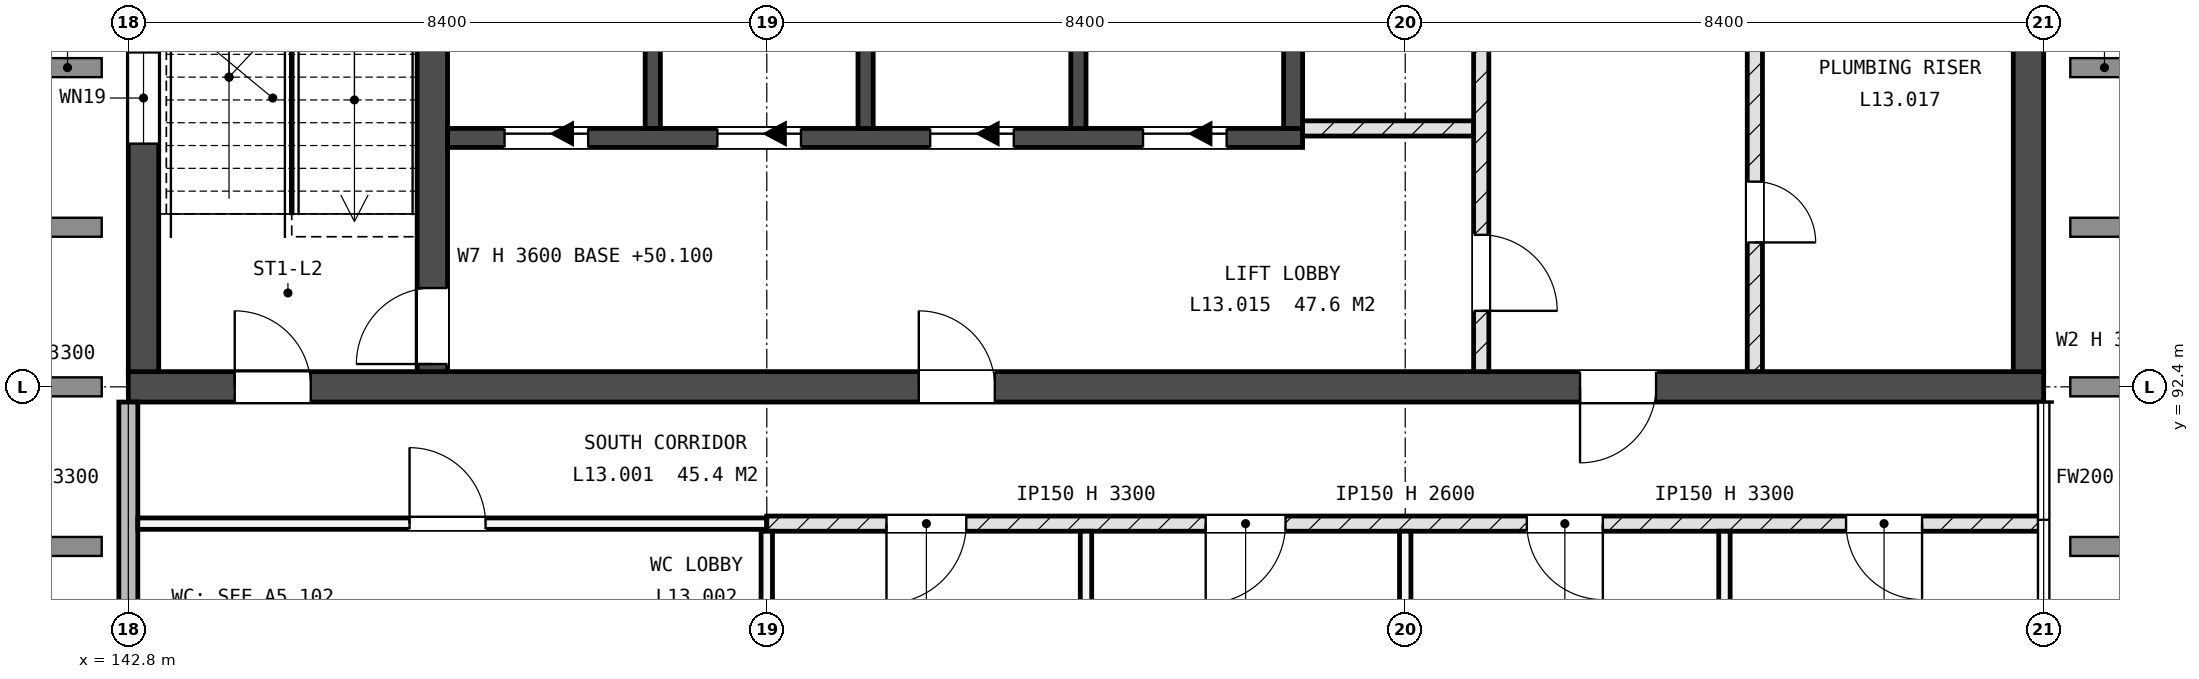
"""IFC4 building model, lengths in metres.
Left out: names, types, materials, properties, quantities, classifications, styles, units other than length and angle.
Written with IfcOpenShell. Run it as: python <this file> out.ifc"""

import sys

from ifc_helpers import new_model, si_unit, direction, frame, frame_2d, origin, place, context, subcontext, project, spatial, rectangle, extrude, element, fill, save


model = new_model("IFC4")
c1 = context("Model", 3, precision=1e-05, world=origin(), true_north=direction((0.0, 1.0)))
c2 = subcontext(c1, "Body", "Model", "MODEL_VIEW")
j1 = project(units=[si_unit("LENGTHUNIT", "METRE"), si_unit("PLANEANGLEUNIT", "RADIAN")], contexts=[c1])
p1 = place(None, origin())
s1 = spatial("IfcSite", under=j1, at=p1, CompositionType="ELEMENT")
p2 = place(p1, origin())
s2 = spatial("IfcBuilding", under=s1, at=p2, CompositionType="ELEMENT")
p3 = place(p2, frame((0.0, 0.0, 50.4)))
s3 = spatial("IfcBuildingStorey", under=s2, at=p3, CompositionType="ELEMENT", Elevation=50.4)
p4 = place(p3, frame((142.8, 92.4, -0.3), z_axis=(0.0, 0.0, 1.0), x_axis=(1.0, 0.0, 0.0)))
e1 = element("IfcWall", 1, at=p4, inside=s3, PredefinedType="SHEAR", context=c2, shape_type="SweptSolid", body=[
    extrude(rectangle(XDim=25.2, YDim=0.4, at=frame_2d((12.6, 0.0))), origin(), (0.0, 0.0, 1.0), 3.6),
])
p5 = place(p4, frame((1.4, 0.0, 0.3)))
e2 = element("IfcOpeningElement", 2, at=p5, cuts=e1, PredefinedType="OPENING", context=c2, shape_type="SweptSolid", body=[
    extrude(rectangle(XDim=1.0, YDim=2.1, at=frame_2d((0.5, 1.05))), frame((0.0, 0.21, 0.0), z_axis=(0.0, -1.0, 0.0), x_axis=(1.0, 0.0, 0.0)), (0.0, 0.0, 1.0), 0.42),
])
p6 = place(p4, frame((19.1, 0.0, 0.3)))
e3 = element("IfcOpeningElement", 3, at=p6, cuts=e1, PredefinedType="OPENING", context=c2, shape_type="SweptSolid", body=[
    extrude(rectangle(XDim=1.0, YDim=2.1, at=frame_2d((0.5, 1.05))), frame((0.0, 0.21, 0.0), z_axis=(0.0, -1.0, 0.0), x_axis=(1.0, 0.0, 0.0)), (0.0, 0.0, 1.0), 0.42),
])
p7 = place(p4, frame((10.4, 0.0, 0.3)))
e4 = element("IfcOpeningElement", 4, at=p7, cuts=e1, PredefinedType="OPENING", context=c2, shape_type="SweptSolid", body=[
    extrude(rectangle(XDim=1.0, YDim=2.1, at=frame_2d((0.5, 1.05))), frame((0.0, 0.21, 0.0), z_axis=(0.0, -1.0, 0.0), x_axis=(1.0, 0.0, 0.0)), (0.0, 0.0, 1.0), 0.42),
])
p8 = place(p3, frame((143.0, 92.6, -0.3), z_axis=(0.0, 0.0, 1.0), x_axis=(0.0, 1.0, 0.0)))
e5 = element("IfcWall", 5, at=p8, inside=s3, PredefinedType="SHEAR", context=c2, shape_type="SweptSolid", body=[
    extrude(rectangle(XDim=16.4, YDim=0.4, at=frame_2d((8.2, 0.0))), origin(), (0.0, 0.0, 1.0), 3.6),
])
p9 = place(p8, frame((3.0, 0.0, 1.9)))
e6 = element("IfcOpeningElement", 6, at=p9, cuts=e5, PredefinedType="OPENING", context=c2, shape_type="SweptSolid", body=[
    extrude(rectangle(XDim=1.2, YDim=0.9, at=frame_2d((0.6, 0.45))), frame((0.0, 0.21, 0.0), z_axis=(0.0, -1.0, 0.0), x_axis=(1.0, 0.0, 0.0)), (0.0, 0.0, 1.0), 0.42),
])
p10 = place(p3, frame((167.8, 92.6, -0.3), z_axis=(0.0, 0.0, 1.0), x_axis=(0.0, 1.0, 0.0)))
e7 = element("IfcWall", 7, at=p10, inside=s3, PredefinedType="SHEAR", context=c2, shape_type="SweptSolid", body=[
    extrude(rectangle(XDim=16.4, YDim=0.4, at=frame_2d((8.2, 0.0))), origin(), (0.0, 0.0, 1.0), 3.6),
])
p11 = place(p10, frame((12.2, 0.0, 1.9)))
e8 = element("IfcOpeningElement", 8, at=p11, cuts=e7, PredefinedType="OPENING", context=c2, shape_type="SweptSolid", body=[
    extrude(rectangle(XDim=1.2, YDim=0.9, at=frame_2d((0.6, 0.45))), frame((0.0, 0.21, 0.0), z_axis=(0.0, -1.0, 0.0), x_axis=(1.0, 0.0, 0.0)), (0.0, 0.0, 1.0), 0.42),
])
p12 = place(p3, frame((146.8, 92.6, -0.3), z_axis=(0.0, 0.0, 1.0), x_axis=(0.0, 1.0, 0.0)))
e9 = element("IfcWall", 9, at=p12, inside=s3, PredefinedType="SHEAR", context=c2, shape_type="SweptSolid", body=[
    extrude(rectangle(XDim=7.525, YDim=0.4, at=frame_2d((3.762, 0.0))), origin(), (0.0, 0.0, 1.0), 3.6),
])
p13 = place(p12, frame((0.1, 0.0, 0.3)))
e10 = element("IfcOpeningElement", 10, at=p13, cuts=e9, PredefinedType="OPENING", context=c2, shape_type="SweptSolid", body=[
    extrude(rectangle(XDim=1.0, YDim=2.1, at=frame_2d((0.5, 1.05))), frame((0.0, 0.21, 0.0), z_axis=(0.0, -1.0, 0.0), x_axis=(1.0, 0.0, 0.0)), (0.0, 0.0, 1.0), 0.42),
])
p14 = place(p3, frame((147.0, 95.675, -0.3), z_axis=(0.0, 0.0, 1.0), x_axis=(1.0, 0.0, 0.0)))
e11 = element("IfcWall", 11, at=p14, inside=s3, PredefinedType="SHEAR", context=c2, shape_type="SweptSolid", body=[
    extrude(rectangle(XDim=11.25, YDim=0.25, at=frame_2d((5.625, 0.0))), origin(), (0.0, 0.0, 1.0), 3.6),
])
p15 = place(p14, frame((0.75, 0.0, 0.3)))
e12 = element("IfcOpeningElement", 12, at=p15, cuts=e11, PredefinedType="OPENING", context=c2, shape_type="SweptSolid", body=[
    extrude(rectangle(XDim=1.1, YDim=2.1, at=frame_2d((0.55, 1.05))), frame((0.0, 0.135, 0.0), z_axis=(0.0, -1.0, 0.0), x_axis=(1.0, 0.0, 0.0)), (0.0, 0.0, 1.0), 0.27),
])
p16 = place(p14, frame((3.55, 0.0, 0.3)))
e13 = element("IfcOpeningElement", 13, at=p16, cuts=e11, PredefinedType="OPENING", context=c2, shape_type="SweptSolid", body=[
    extrude(rectangle(XDim=1.1, YDim=2.1, at=frame_2d((0.55, 1.05))), frame((0.0, 0.135, 0.0), z_axis=(0.0, -1.0, 0.0), x_axis=(1.0, 0.0, 0.0)), (0.0, 0.0, 1.0), 0.27),
])
p17 = place(p14, frame((6.35, 0.0, 0.3)))
e14 = element("IfcOpeningElement", 14, at=p17, cuts=e11, PredefinedType="OPENING", context=c2, shape_type="SweptSolid", body=[
    extrude(rectangle(XDim=1.1, YDim=2.1, at=frame_2d((0.55, 1.05))), frame((0.0, 0.135, 0.0), z_axis=(0.0, -1.0, 0.0), x_axis=(1.0, 0.0, 0.0)), (0.0, 0.0, 1.0), 0.27),
])
p18 = place(p14, frame((9.15, 0.0, 0.3)))
e15 = element("IfcOpeningElement", 15, at=p18, cuts=e11, PredefinedType="OPENING", context=c2, shape_type="SweptSolid", body=[
    extrude(rectangle(XDim=1.1, YDim=2.1, at=frame_2d((0.55, 1.05))), frame((0.0, 0.135, 0.0), z_axis=(0.0, -1.0, 0.0), x_axis=(1.0, 0.0, 0.0)), (0.0, 0.0, 1.0), 0.27),
])
p19 = place(p3, frame((158.125, 95.8, -0.3), z_axis=(0.0, 0.0, 1.0), x_axis=(0.0, 1.0, 0.0)))
e16 = element("IfcWall", 16, at=p19, inside=s3, PredefinedType="SHEAR", context=c2, shape_type="SweptSolid", body=[
    extrude(rectangle(XDim=2.9, YDim=0.25, at=frame_2d((1.45, 0.0))), origin(), (0.0, 0.0, 1.0), 3.6),
])
for number, where, z_axis, x_axis in (
    (17, (149.7, 95.8, -0.3), (0.0, 0.0, 1.0), (0.0, 1.0, 0.0)),
    (18, (152.5, 95.8, -0.3), (0.0, 0.0, 1.0), (0.0, 1.0, 0.0)),
    (19, (155.3, 95.8, -0.3), (0.0, 0.0, 1.0), (0.0, 1.0, 0.0)),
):
    element("IfcWall", number, at=place(p3, frame(where, z_axis=z_axis, x_axis=x_axis)), inside=s3, PredefinedType="SHEAR", context=c2, shape_type="SweptSolid", body=[
        extrude(rectangle(XDim=2.9, YDim=0.2, at=frame_2d((1.45, 0.0))), origin(), (0.0, 0.0, 1.0), 3.6),
    ])
p20 = place(p3, frame((142.8, 84.35, 0.0), z_axis=(0.0, 0.0, 1.0), x_axis=(0.0, 1.0, 0.0)))
e20 = element("IfcWall", 20, at=p20, inside=s3, PredefinedType="STANDARD", context=c2, shape_type="SweptSolid", body=[
    extrude(rectangle(XDim=7.85, YDim=0.25, at=frame_2d((3.925, 0.0))), origin(), (0.0, 0.0, 1.0), 3.3),
])
p21 = place(p20, frame((2.35, 0.0, 2.1)))
e21 = element("IfcOpeningElement", 21, at=p21, cuts=e20, PredefinedType="OPENING", context=c2, shape_type="SweptSolid", body=[
    extrude(rectangle(XDim=0.9, YDim=0.6, at=frame_2d((0.45, 0.3))), frame((0.0, 0.135, 0.0), z_axis=(0.0, -1.0, 0.0), x_axis=(1.0, 0.0, 0.0)), (0.0, 0.0, 1.0), 0.27),
])
p22 = place(p3, frame((142.925, 90.6, 0.0), z_axis=(0.0, 0.0, 1.0), x_axis=(1.0, 0.0, 0.0)))
e22 = element("IfcWall", 22, at=p22, inside=s3, PredefinedType="PARTITIONING", context=c2, shape_type="SweptSolid", body=[
    extrude(rectangle(XDim=8.275, YDim=0.15, at=frame_2d((4.137, 0.0))), origin(), (0.0, 0.0, 1.0), 3.3),
])
p23 = place(p22, frame((3.575, 0.0, 0.0)))
e23 = element("IfcOpeningElement", 23, at=p23, cuts=e22, PredefinedType="OPENING", context=c2, shape_type="SweptSolid", body=[
    extrude(rectangle(XDim=1.0, YDim=2.1, at=frame_2d((0.5, 1.05))), frame((0.0, 0.085, 0.0), z_axis=(0.0, -1.0, 0.0), x_axis=(1.0, 0.0, 0.0)), (0.0, 0.0, 1.0), 0.17),
])
p24 = place(p3, frame((151.2, 90.6, 0.0), z_axis=(0.0, 0.0, 1.0), x_axis=(1.0, 0.0, 0.0)))
e24 = element("IfcWall", 24, at=p24, inside=s3, PredefinedType="SOLIDWALL", context=c2, shape_type="SweptSolid", body=[
    extrude(rectangle(XDim=16.8, YDim=0.2, at=frame_2d((8.4, 0.0))), origin(), (0.0, 0.0, 1.0), 3.3),
])
p25 = place(p24, frame((1.575, 0.0, 0.0)))
e25 = element("IfcOpeningElement", 25, at=p25, cuts=e24, PredefinedType="OPENING", context=c2, shape_type="SweptSolid", body=[
    extrude(rectangle(XDim=1.05, YDim=2.1, at=frame_2d((0.525, 1.05))), frame((0.0, 0.11, 0.0), z_axis=(0.0, -1.0, 0.0), x_axis=(1.0, 0.0, 0.0)), (0.0, 0.0, 1.0), 0.22),
])
p26 = place(p24, frame((5.775, 0.0, 0.0)))
e26 = element("IfcOpeningElement", 26, at=p26, cuts=e24, PredefinedType="OPENING", context=c2, shape_type="SweptSolid", body=[
    extrude(rectangle(XDim=1.05, YDim=2.1, at=frame_2d((0.525, 1.05))), frame((0.0, 0.11, 0.0), z_axis=(0.0, -1.0, 0.0), x_axis=(1.0, 0.0, 0.0)), (0.0, 0.0, 1.0), 0.22),
])
p27 = place(p24, frame((10.0, 0.0, 0.0)))
e27 = element("IfcOpeningElement", 27, at=p27, cuts=e24, PredefinedType="OPENING", context=c2, shape_type="SweptSolid", body=[
    extrude(rectangle(XDim=1.0, YDim=2.1, at=frame_2d((0.5, 1.05))), frame((0.0, 0.11, 0.0), z_axis=(0.0, -1.0, 0.0), x_axis=(1.0, 0.0, 0.0)), (0.0, 0.0, 1.0), 0.22),
])
p28 = place(p24, frame((14.2, 0.0, 0.0)))
e28 = element("IfcOpeningElement", 28, at=p28, cuts=e24, PredefinedType="OPENING", context=c2, shape_type="SweptSolid", body=[
    extrude(rectangle(XDim=1.0, YDim=2.1, at=frame_2d((0.5, 1.05))), frame((0.0, 0.11, 0.0), z_axis=(0.0, -1.0, 0.0), x_axis=(1.0, 0.0, 0.0)), (0.0, 0.0, 1.0), 0.22),
])
p29 = place(p3, frame((158.25, 95.8, 0.0), z_axis=(0.0, 0.0, 1.0), x_axis=(1.0, 0.0, 0.0)))
e29 = element("IfcWall", 29, at=p29, inside=s3, PredefinedType="SOLIDWALL", context=c2, shape_type="SweptSolid", body=[
    extrude(rectangle(XDim=2.25, YDim=0.2, at=frame_2d((1.125, 0.0))), origin(), (0.0, 0.0, 1.0), 3.3),
])
p30 = place(p3, frame((151.2, 84.0, 0.0), z_axis=(0.0, 0.0, 1.0), x_axis=(0.0, 1.0, 0.0)))
e30 = element("IfcWall", 30, at=p30, inside=s3, PredefinedType="PARTITIONING", context=c2, shape_type="SweptSolid", body=[
    extrude(rectangle(XDim=6.5, YDim=0.15, at=frame_2d((3.25, 0.0))), origin(), (0.0, 0.0, 1.0), 2.6),
])
p31 = place(p3, frame((155.4, 84.0, 0.0), z_axis=(0.0, 0.0, 1.0), x_axis=(0.0, 1.0, 0.0)))
e31 = element("IfcWall", 31, at=p31, inside=s3, PredefinedType="PARTITIONING", context=c2, shape_type="SweptSolid", body=[
    extrude(rectangle(XDim=6.5, YDim=0.15, at=frame_2d((3.25, 0.0))), origin(), (0.0, 0.0, 1.0), 3.3),
])
p32 = place(p3, frame((159.6, 84.0, 0.0), z_axis=(0.0, 0.0, 1.0), x_axis=(0.0, 1.0, 0.0)))
e32 = element("IfcWall", 32, at=p32, inside=s3, PredefinedType="PARTITIONING", context=c2, shape_type="SweptSolid", body=[
    extrude(rectangle(XDim=6.5, YDim=0.15, at=frame_2d((3.25, 0.0))), origin(), (0.0, 0.0, 1.0), 2.6),
])
p33 = place(p3, frame((160.6, 92.6, 0.0), z_axis=(0.0, 0.0, 1.0), x_axis=(0.0, 1.0, 0.0)))
e33 = element("IfcWall", 33, at=p33, inside=s3, PredefinedType="SOLIDWALL", context=c2, shape_type="SweptSolid", body=[
    extrude(rectangle(XDim=12.5, YDim=0.2, at=frame_2d((6.25, 0.0))), origin(), (0.0, 0.0, 1.0), 3.3),
])
p34 = place(p33, frame((5.1, 0.0, 0.0)))
e34 = element("IfcOpeningElement", 34, at=p34, cuts=e33, PredefinedType="OPENING", context=c2, shape_type="SweptSolid", body=[
    extrude(rectangle(XDim=0.8, YDim=2.1, at=frame_2d((0.4, 1.05))), frame((0.0, 0.11, 0.0), z_axis=(0.0, -1.0, 0.0), x_axis=(1.0, 0.0, 0.0)), (0.0, 0.0, 1.0), 0.22),
])
p35 = place(p33, frame((0.8, 0.0, 0.0)))
e35 = element("IfcOpeningElement", 35, at=p35, cuts=e33, PredefinedType="OPENING", context=c2, shape_type="SweptSolid", body=[
    extrude(rectangle(XDim=1.0, YDim=2.1, at=frame_2d((0.5, 1.05))), frame((0.0, 0.11, 0.0), z_axis=(0.0, -1.0, 0.0), x_axis=(1.0, 0.0, 0.0)), (0.0, 0.0, 1.0), 0.22),
])
p36 = place(p3, frame((163.8, 84.0, 0.0), z_axis=(0.0, 0.0, 1.0), x_axis=(0.0, 1.0, 0.0)))
e36 = element("IfcWall", 36, at=p36, inside=s3, PredefinedType="PARTITIONING", context=c2, shape_type="SweptSolid", body=[
    extrude(rectangle(XDim=6.5, YDim=0.15, at=frame_2d((3.25, 0.0))), origin(), (0.0, 0.0, 1.0), 3.3),
])
p37 = place(p3, frame((164.2, 92.6, 0.0), z_axis=(0.0, 0.0, 1.0), x_axis=(0.0, 1.0, 0.0)))
e37 = element("IfcWall", 37, at=p37, inside=s3, PredefinedType="SOLIDWALL", context=c2, shape_type="SweptSolid", body=[
    extrude(rectangle(XDim=8.75, YDim=0.2, at=frame_2d((4.375, 0.0))), origin(), (0.0, 0.0, 1.0), 3.3),
])
p38 = place(p37, frame((1.7, 0.0, 0.0)))
e38 = element("IfcOpeningElement", 38, at=p38, cuts=e37, PredefinedType="OPENING", context=c2, shape_type="SweptSolid", body=[
    extrude(rectangle(XDim=0.8, YDim=2.1, at=frame_2d((0.4, 1.05))), frame((0.0, 0.11, 0.0), z_axis=(0.0, -1.0, 0.0), x_axis=(1.0, 0.0, 0.0)), (0.0, 0.0, 1.0), 0.22),
])
p39 = place(p37, frame((6.3, 0.0, 0.0)))
e39 = element("IfcOpeningElement", 39, at=p39, cuts=e37, PredefinedType="OPENING", context=c2, shape_type="SweptSolid", body=[
    extrude(rectangle(XDim=0.8, YDim=2.1, at=frame_2d((0.4, 1.05))), frame((0.0, 0.11, 0.0), z_axis=(0.0, -1.0, 0.0), x_axis=(1.0, 0.0, 0.0)), (0.0, 0.0, 1.0), 0.22),
])
p40 = place(p9, origin())
e40 = element("IfcWindow", 40, at=p40, inside=s3, PartitioningType="SINGLE_PANEL", PredefinedType="WINDOW", context=c2, shape_type="SweptSolid", body=[
    extrude(rectangle(XDim=1.2, YDim=0.9, at=frame_2d((0.6, 0.45))), frame((0.0, 0.03, 0.0), z_axis=(0.0, -1.0, 0.0), x_axis=(1.0, 0.0, 0.0)), (0.0, 0.0, 1.0), 0.06),
])
fill(e6, e40)
p41 = place(p15, origin())
e41 = element("IfcDoor", 41, at=p41, inside=s3, OperationType="SLIDING_TO_LEFT", PredefinedType="DOOR", context=c2, shape_type="SweptSolid", body=[
    extrude(rectangle(XDim=1.1, YDim=2.1, at=frame_2d((0.55, 1.05))), frame((0.0, 0.025, 0.0), z_axis=(0.0, -1.0, 0.0), x_axis=(1.0, 0.0, 0.0)), (0.0, 0.0, 1.0), 0.05),
])
fill(e12, e41)
p42 = place(p16, origin())
e42 = element("IfcDoor", 42, at=p42, inside=s3, OperationType="SLIDING_TO_LEFT", PredefinedType="DOOR", context=c2, shape_type="SweptSolid", body=[
    extrude(rectangle(XDim=1.1, YDim=2.1, at=frame_2d((0.55, 1.05))), frame((0.0, 0.025, 0.0), z_axis=(0.0, -1.0, 0.0), x_axis=(1.0, 0.0, 0.0)), (0.0, 0.0, 1.0), 0.05),
])
fill(e13, e42)
p43 = place(p17, origin())
e43 = element("IfcDoor", 43, at=p43, inside=s3, OperationType="SLIDING_TO_LEFT", PredefinedType="DOOR", context=c2, shape_type="SweptSolid", body=[
    extrude(rectangle(XDim=1.1, YDim=2.1, at=frame_2d((0.55, 1.05))), frame((0.0, 0.025, 0.0), z_axis=(0.0, -1.0, 0.0), x_axis=(1.0, 0.0, 0.0)), (0.0, 0.0, 1.0), 0.05),
])
fill(e14, e43)
p44 = place(p18, origin())
e44 = element("IfcDoor", 44, at=p44, inside=s3, OperationType="SLIDING_TO_LEFT", PredefinedType="DOOR", context=c2, shape_type="SweptSolid", body=[
    extrude(rectangle(XDim=1.1, YDim=2.1, at=frame_2d((0.55, 1.05))), frame((0.0, 0.025, 0.0), z_axis=(0.0, -1.0, 0.0), x_axis=(1.0, 0.0, 0.0)), (0.0, 0.0, 1.0), 0.05),
])
fill(e15, e44)
p45 = place(p5, origin())
e45 = element("IfcDoor", 45, at=p45, inside=s3, OperationType="SINGLE_SWING_RIGHT", PredefinedType="DOOR", context=c2, shape_type="SweptSolid", body=[
    extrude(rectangle(XDim=1.0, YDim=2.1, at=frame_2d((0.5, 1.05))), frame((0.0, 0.025, 0.0), z_axis=(0.0, -1.0, 0.0), x_axis=(1.0, 0.0, 0.0)), (0.0, 0.0, 1.0), 0.05),
])
fill(e2, e45)
p46 = place(p13, origin())
e46 = element("IfcDoor", 46, at=p46, inside=s3, OperationType="SINGLE_SWING_RIGHT", PredefinedType="DOOR", context=c2, shape_type="SweptSolid", body=[
    extrude(rectangle(XDim=1.0, YDim=2.1, at=frame_2d((0.5, 1.05))), frame((0.0, 0.025, 0.0), z_axis=(0.0, -1.0, 0.0), x_axis=(1.0, 0.0, 0.0)), (0.0, 0.0, 1.0), 0.05),
])
fill(e10, e46)
p47 = place(p25, origin())
e47 = element("IfcDoor", 47, at=p47, inside=s3, OperationType="SINGLE_SWING_LEFT", PredefinedType="DOOR", context=c2, shape_type="SweptSolid", body=[
    extrude(rectangle(XDim=1.05, YDim=2.1, at=frame_2d((0.525, 1.05))), frame((0.0, 0.025, 0.0), z_axis=(0.0, -1.0, 0.0), x_axis=(1.0, 0.0, 0.0)), (0.0, 0.0, 1.0), 0.05),
])
fill(e25, e47)
p48 = place(p26, origin())
e48 = element("IfcDoor", 48, at=p48, inside=s3, OperationType="SINGLE_SWING_LEFT", PredefinedType="DOOR", context=c2, shape_type="SweptSolid", body=[
    extrude(rectangle(XDim=1.05, YDim=2.1, at=frame_2d((0.525, 1.05))), frame((0.0, 0.025, 0.0), z_axis=(0.0, -1.0, 0.0), x_axis=(1.0, 0.0, 0.0)), (0.0, 0.0, 1.0), 0.05),
])
fill(e26, e48)
p49 = place(p27, origin())
e49 = element("IfcDoor", 49, at=p49, inside=s3, OperationType="SINGLE_SWING_RIGHT", PredefinedType="DOOR", context=c2, shape_type="SweptSolid", body=[
    extrude(rectangle(XDim=1.0, YDim=2.1, at=frame_2d((0.5, 1.05))), frame((0.0, 0.025, 0.0), z_axis=(0.0, -1.0, 0.0), x_axis=(1.0, 0.0, 0.0)), (0.0, 0.0, 1.0), 0.05),
])
fill(e27, e49)
p50 = place(p28, origin())
e50 = element("IfcDoor", 50, at=p50, inside=s3, OperationType="SINGLE_SWING_RIGHT", PredefinedType="DOOR", context=c2, shape_type="SweptSolid", body=[
    extrude(rectangle(XDim=1.0, YDim=2.1, at=frame_2d((0.5, 1.05))), frame((0.0, 0.025, 0.0), z_axis=(0.0, -1.0, 0.0), x_axis=(1.0, 0.0, 0.0)), (0.0, 0.0, 1.0), 0.05),
])
fill(e28, e50)
p51 = place(p38, origin())
e51 = element("IfcDoor", 51, at=p51, inside=s3, OperationType="SINGLE_SWING_LEFT", PredefinedType="DOOR", context=c2, shape_type="SweptSolid", body=[
    extrude(rectangle(XDim=0.8, YDim=2.1, at=frame_2d((0.4, 1.05))), frame((0.0, 0.025, 0.0), z_axis=(0.0, -1.0, 0.0), x_axis=(1.0, 0.0, 0.0)), (0.0, 0.0, 1.0), 0.05),
])
fill(e38, e51)
p52 = place(p23, origin())
e52 = element("IfcDoor", 52, at=p52, inside=s3, OperationType="SINGLE_SWING_RIGHT", PredefinedType="DOOR", context=c2, shape_type="SweptSolid", body=[
    extrude(rectangle(XDim=1.0, YDim=2.1, at=frame_2d((0.5, 1.05))), frame((0.0, 0.025, 0.0), z_axis=(0.0, -1.0, 0.0), x_axis=(1.0, 0.0, 0.0)), (0.0, 0.0, 1.0), 0.05),
])
fill(e23, e52)
p53 = place(p6, origin())
e53 = element("IfcDoor", 53, at=p53, inside=s3, OperationType="SINGLE_SWING_LEFT", PredefinedType="DOOR", context=c2, shape_type="SweptSolid", body=[
    extrude(rectangle(XDim=1.0, YDim=2.1, at=frame_2d((0.5, 1.05))), frame((0.0, 0.025, 0.0), z_axis=(0.0, -1.0, 0.0), x_axis=(1.0, 0.0, 0.0)), (0.0, 0.0, 1.0), 0.05),
])
fill(e3, e53)
p54 = place(p7, origin())
e54 = element("IfcDoor", 54, at=p54, inside=s3, OperationType="SINGLE_SWING_RIGHT", PredefinedType="DOOR", context=c2, shape_type="SweptSolid", body=[
    extrude(rectangle(XDim=1.0, YDim=2.1, at=frame_2d((0.5, 1.05))), frame((0.0, 0.025, 0.0), z_axis=(0.0, -1.0, 0.0), x_axis=(1.0, 0.0, 0.0)), (0.0, 0.0, 1.0), 0.05),
])
fill(e4, e54)
p55 = place(p35, origin())
e55 = element("IfcDoor", 55, at=p55, inside=s3, OperationType="SINGLE_SWING_LEFT", PredefinedType="DOOR", context=c2, shape_type="SweptSolid", body=[
    extrude(rectangle(XDim=1.0, YDim=2.1, at=frame_2d((0.5, 1.05))), frame((0.0, 0.025, 0.0), z_axis=(0.0, -1.0, 0.0), x_axis=(1.0, 0.0, 0.0)), (0.0, 0.0, 1.0), 0.05),
])
fill(e35, e55)
save(model, sys.argv[1])
